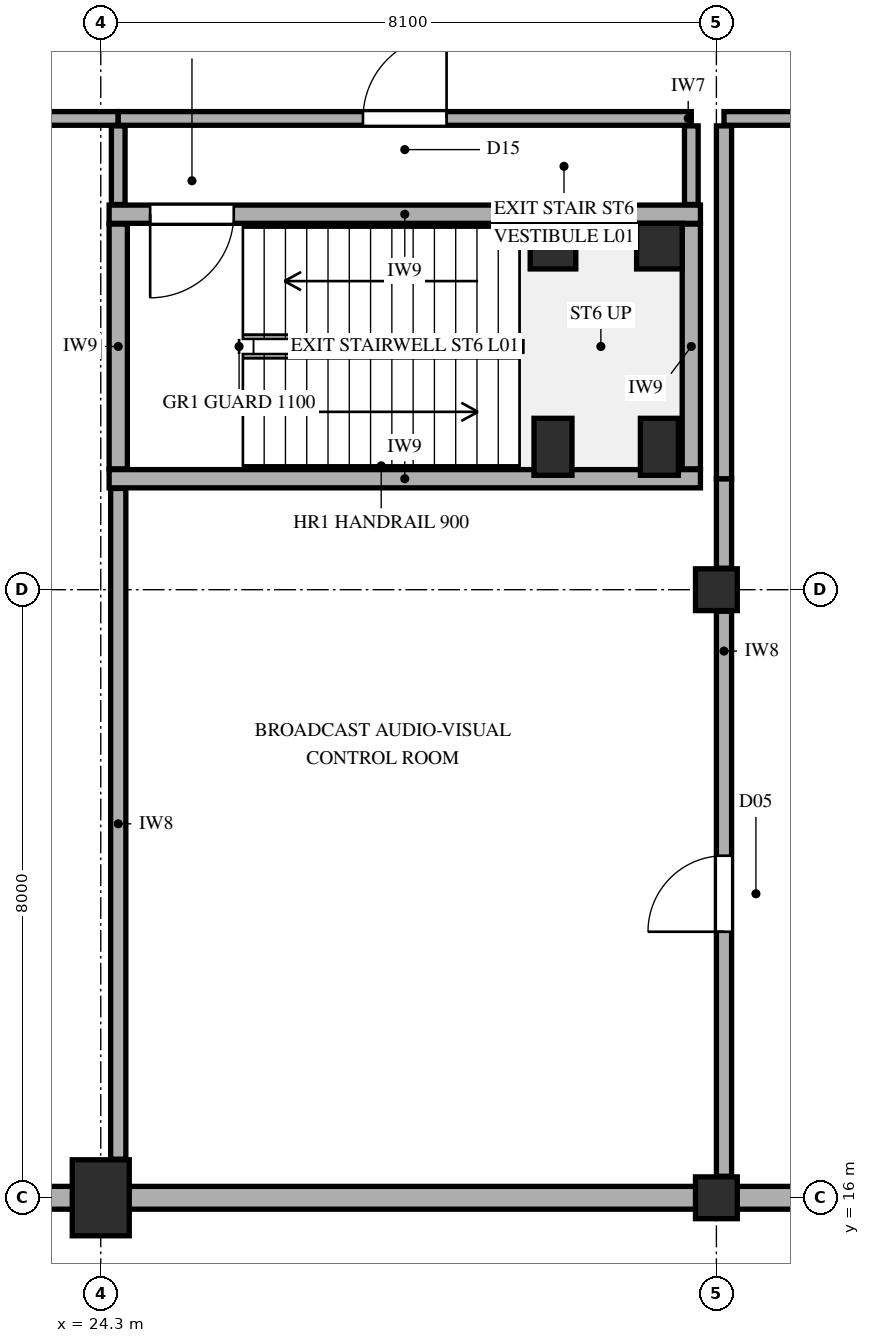
"""IFC4 building model, lengths in metres.
Left out: names, types, materials, properties, quantities, classifications, styles, units other than length and angle.
Written with IfcOpenShell. Run it as: python <this file> out.ifc"""

import sys

from ifc_helpers import new_model, si_unit, direction, frame, frame_2d, origin, origin_2d, place, context, subcontext, project, spatial, rectangle, extrude, element, fill, save


model = new_model("IFC4")
c1 = context("Model", 3, precision=1e-05, world=origin(), true_north=direction((0.0, 1.0)))
c2 = subcontext(c1, "Body", "Model", "MODEL_VIEW")
j1 = project(units=[si_unit("LENGTHUNIT", "METRE"), si_unit("PLANEANGLEUNIT", "RADIAN")], contexts=[c1])
p1 = place(None, origin())
s1 = spatial("IfcSite", under=j1, at=p1, CompositionType="ELEMENT")
p2 = place(p1, origin())
s2 = spatial("IfcBuilding", under=s1, at=p2, CompositionType="ELEMENT")
p3 = place(p2, frame((0.0, 0.0, 5.4)))
s3 = spatial("IfcBuildingStorey", under=s2, at=p3, CompositionType="ELEMENT", Elevation=5.4)
p4 = place(p3, frame((24.3, 16.0, 0.0), z_axis=(0.0, 0.0, 1.0), x_axis=(1.0, 0.0, 0.0)))
e1 = element("IfcColumn", 1, at=p4, inside=s3, PredefinedType="COLUMN", context=c2, shape_type="SweptSolid", body=[
    extrude(rectangle(XDim=0.75, YDim=1.0, at=origin_2d()), origin(), (0.0, 0.0, 1.0), 4.8),
])
p5 = place(p3, frame((30.25, 25.88, 0.0), z_axis=(0.0, 0.0, 1.0), x_axis=(1.0, 0.0, 0.0)))
e2 = element("IfcColumn", 2, at=p5, inside=s3, PredefinedType="COLUMN", context=c2, shape_type="SweptSolid", body=[
    extrude(rectangle(XDim=0.5, YDim=0.75, at=origin_2d()), origin(), (0.0, 0.0, 1.0), 4.8),
])
p6 = place(p3, frame((30.25, 28.52, 0.0), z_axis=(0.0, 0.0, 1.0), x_axis=(1.0, 0.0, 0.0)))
e3 = element("IfcColumn", 3, at=p6, inside=s3, PredefinedType="COLUMN", context=c2, shape_type="SweptSolid", body=[
    extrude(rectangle(XDim=0.6, YDim=0.6, at=origin_2d()), origin(), (0.0, 0.0, 1.0), 4.8),
])
p7 = place(p3, frame((31.65, 25.88, 0.0), z_axis=(0.0, 0.0, 1.0), x_axis=(1.0, 0.0, 0.0)))
e4 = element("IfcColumn", 4, at=p7, inside=s3, PredefinedType="COLUMN", context=c2, shape_type="SweptSolid", body=[
    extrude(rectangle(XDim=0.5, YDim=0.75, at=origin_2d()), origin(), (0.0, 0.0, 1.0), 4.8),
])
p8 = place(p3, frame((31.65, 28.52, 0.0), z_axis=(0.0, 0.0, 1.0), x_axis=(1.0, 0.0, 0.0)))
e5 = element("IfcColumn", 5, at=p8, inside=s3, PredefinedType="COLUMN", context=c2, shape_type="SweptSolid", body=[
    extrude(rectangle(XDim=0.6, YDim=0.6, at=origin_2d()), origin(), (0.0, 0.0, 1.0), 4.8),
])
for number, where, z_axis, x_axis in (
    (6, (32.4, 16.0, 0.0), (0.0, 0.0, 1.0), (1.0, 0.0, 0.0)),
    (7, (32.4, 24.0, 0.0), (0.0, 0.0, 1.0), (1.0, 0.0, 0.0)),
):
    element("IfcColumn", number, at=place(p3, frame(where, z_axis=z_axis, x_axis=x_axis)), inside=s3, PredefinedType="COLUMN", context=c2, shape_type="SweptSolid", body=[
        extrude(rectangle(XDim=0.55, YDim=0.55, at=origin_2d()), origin(), (0.0, 0.0, 1.0), 4.8),
    ])
p9 = place(p3, frame((16.2, 16.0, 0.0), z_axis=(0.0, 0.0, 1.0), x_axis=(1.0, 0.0, 0.0)))
e8 = element("IfcWall", 8, at=p9, inside=s3, PredefinedType="SOLIDWALL", context=c2, shape_type="SweptSolid", body=[
    extrude(rectangle(XDim=16.2, YDim=0.3, at=frame_2d((8.1, 0.0))), origin(), (0.0, 0.0, 1.0), 3.812),
])
p10 = place(p3, frame((32.4, 16.0, 0.0), z_axis=(0.0, 0.0, 1.0), x_axis=(1.0, 0.0, 0.0)))
e9 = element("IfcWall", 9, at=p10, inside=s3, PredefinedType="SOLIDWALL", context=c2, shape_type="SweptSolid", body=[
    extrude(rectangle(XDim=16.2, YDim=0.3, at=frame_2d((8.1, 0.0))), origin(), (0.0, 0.0, 1.0), 3.812),
])
p11 = place(p3, frame((24.41, 25.46, 0.0), z_axis=(0.0, 0.0, 1.0), x_axis=(1.0, 0.0, 0.0)))
e10 = element("IfcWall", 10, at=p11, inside=s3, PredefinedType="PARTITIONING", context=c2, shape_type="SweptSolid", body=[
    extrude(rectangle(XDim=7.78, YDim=0.24, at=frame_2d((3.89, 0.0))), origin(), (0.0, 0.0, 1.0), 4.52),
])
p12 = place(p3, frame((24.41, 28.94, 0.0), z_axis=(0.0, 0.0, 1.0), x_axis=(1.0, 0.0, 0.0)))
e11 = element("IfcWall", 11, at=p12, inside=s3, PredefinedType="PARTITIONING", context=c2, shape_type="SweptSolid", body=[
    extrude(rectangle(XDim=7.78, YDim=0.24, at=frame_2d((3.89, 0.0))), origin(), (0.0, 0.0, 1.0), 4.52),
])
p13 = place(p12, frame((0.54, 0.0, 0.0)))
e12 = element("IfcOpeningElement", 12, at=p13, cuts=e11, PredefinedType="OPENING", context=c2, shape_type="SweptSolid", body=[
    extrude(rectangle(XDim=1.1, YDim=2.2, at=frame_2d((0.55, 1.1))), frame((0.0, 0.13, 0.0), z_axis=(0.0, -1.0, 0.0), x_axis=(1.0, 0.0, 0.0)), (0.0, 0.0, 1.0), 0.26),
])
p14 = place(p3, frame((24.53, 25.59, 0.0), z_axis=(0.0, 0.0, 1.0), x_axis=(0.0, 1.0, 0.0)))
e13 = element("IfcWall", 13, at=p14, inside=s3, PredefinedType="PARTITIONING", context=c2, shape_type="SweptSolid", body=[
    extrude(rectangle(XDim=3.22, YDim=0.24, at=frame_2d((1.61, 0.0))), origin(), (0.0, 0.0, 1.0), 3.312),
])
p15 = place(p3, frame((32.07, 25.59, 0.0), z_axis=(0.0, 0.0, 1.0), x_axis=(0.0, 1.0, 0.0)))
e14 = element("IfcWall", 14, at=p15, inside=s3, PredefinedType="PARTITIONING", context=c2, shape_type="SweptSolid", body=[
    extrude(rectangle(XDim=3.22, YDim=0.24, at=frame_2d((1.61, 0.0))), origin(), (0.0, 0.0, 1.0), 3.912),
])
p16 = place(p3, frame((8.258, 30.2, 0.0), z_axis=(0.0, 0.0, 1.0), x_axis=(1.0, 0.0, 0.0)))
e15 = element("IfcWall", 15, at=p16, inside=s3, PredefinedType="PARTITIONING", context=c2, shape_type="SweptSolid", body=[
    extrude(rectangle(XDim=16.272, YDim=0.18, at=frame_2d((8.136, 0.0))), origin(), (0.0, 0.0, 1.0), 4.52),
])
p17 = place(p16, frame((4.782, 0.0, 0.0)))
e16 = element("IfcOpeningElement", 16, at=p17, cuts=e15, PredefinedType="OPENING", context=c2, shape_type="SweptSolid", body=[
    extrude(rectangle(XDim=1.5, YDim=2.3, at=frame_2d((0.75, 1.15))), frame((0.0, 0.1, 0.0), z_axis=(0.0, -1.0, 0.0), x_axis=(1.0, 0.0, 0.0)), (0.0, 0.0, 1.0), 0.2),
])
p18 = place(p3, frame((24.53, 30.2, 0.0), z_axis=(0.0, 0.0, 1.0), x_axis=(1.0, 0.0, 0.0)))
e17 = element("IfcWall", 17, at=p18, inside=s3, PredefinedType="PARTITIONING", context=c2, shape_type="SweptSolid", body=[
    extrude(rectangle(XDim=7.54, YDim=0.18, at=frame_2d((3.77, 0.0))), origin(), (0.0, 0.0, 1.0), 4.52),
])
p19 = place(p18, frame((3.22, 0.0, 0.0)))
e18 = element("IfcOpeningElement", 18, at=p19, cuts=e17, PredefinedType="OPENING", context=c2, shape_type="SweptSolid", body=[
    extrude(rectangle(XDim=1.1, YDim=2.2, at=frame_2d((0.55, 1.1))), frame((0.0, 0.1, 0.0), z_axis=(0.0, -1.0, 0.0), x_axis=(1.0, 0.0, 0.0)), (0.0, 0.0, 1.0), 0.2),
])
p20 = place(p3, frame((32.5, 30.2, 0.0), z_axis=(0.0, 0.0, 1.0), x_axis=(1.0, 0.0, 0.0)))
e19 = element("IfcWall", 19, at=p20, inside=s3, PredefinedType="PARTITIONING", context=c2, shape_type="SweptSolid", body=[
    extrude(rectangle(XDim=23.3, YDim=0.18, at=frame_2d((11.65, 0.0))), origin(), (0.0, 0.0, 1.0), 4.52),
])
p21 = place(p20, frame((10.85, 0.0, 0.0)))
e20 = element("IfcOpeningElement", 20, at=p21, cuts=e19, PredefinedType="OPENING", context=c2, shape_type="SweptSolid", body=[
    extrude(rectangle(XDim=1.6, YDim=2.35, at=frame_2d((0.8, 1.175))), frame((0.0, 0.1, 0.0), z_axis=(0.0, -1.0, 0.0), x_axis=(1.0, 0.0, 0.0)), (0.0, 0.0, 1.0), 0.2),
])
p22 = place(p3, frame((24.53, 16.508, 0.0), z_axis=(0.0, 0.0, 1.0), x_axis=(0.0, 1.0, 0.0)))
e21 = element("IfcWall", 21, at=p22, inside=s3, PredefinedType="PARTITIONING", context=c2, shape_type="SweptSolid", body=[
    extrude(rectangle(XDim=8.824, YDim=0.2, at=frame_2d((4.412, 0.0))), origin(), (0.0, 0.0, 1.0), 3.312),
])
p23 = place(p3, frame((24.53, 29.068, 0.0), z_axis=(0.0, 0.0, 1.0), x_axis=(0.0, 1.0, 0.0)))
e22 = element("IfcWall", 22, at=p23, inside=s3, PredefinedType="PARTITIONING", context=c2, shape_type="SweptSolid", body=[
    extrude(rectangle(XDim=1.034, YDim=0.18, at=frame_2d((0.517, 0.0))), origin(), (0.0, 0.0, 1.0), 3.312),
])
p24 = place(p3, frame((32.07, 29.068, 0.0), z_axis=(0.0, 0.0, 1.0), x_axis=(0.0, 1.0, 0.0)))
e23 = element("IfcWall", 23, at=p24, inside=s3, PredefinedType="PARTITIONING", context=c2, shape_type="SweptSolid", body=[
    extrude(rectangle(XDim=1.034, YDim=0.18, at=frame_2d((0.517, 0.0))), origin(), (0.0, 0.0, 1.0), 3.912),
])
p25 = place(p3, frame((32.5, 16.283, 0.0), z_axis=(0.0, 0.0, 1.0), x_axis=(0.0, 1.0, 0.0)))
e24 = element("IfcWall", 24, at=p25, inside=s3, PredefinedType="PARTITIONING", context=c2, shape_type="SweptSolid", body=[
    extrude(rectangle(XDim=7.434, YDim=0.2, at=frame_2d((3.717, 0.0))), origin(), (0.0, 0.0, 1.0), 4.095),
])
p26 = place(p25, frame((3.217, 0.0, 0.0)))
e25 = element("IfcOpeningElement", 25, at=p26, cuts=e24, PredefinedType="OPENING", context=c2, shape_type="SweptSolid", body=[
    extrude(rectangle(XDim=1.0, YDim=2.2, at=frame_2d((0.5, 1.1))), frame((0.0, 0.11, 0.0), z_axis=(0.0, -1.0, 0.0), x_axis=(1.0, 0.0, 0.0)), (0.0, 0.0, 1.0), 0.22),
])
p27 = place(p3, frame((32.5, 24.283, 0.0), z_axis=(0.0, 0.0, 1.0), x_axis=(0.0, 1.0, 0.0)))
e26 = element("IfcWall", 26, at=p27, inside=s3, PredefinedType="PARTITIONING", context=c2, shape_type="SweptSolid", body=[
    extrude(rectangle(XDim=1.177, YDim=0.2, at=frame_2d((0.588, 0.0))), origin(), (0.0, 0.0, 1.0), 3.912),
])
p28 = place(p3, frame((32.5, 25.46, 0.0), z_axis=(0.0, 0.0, 1.0), x_axis=(0.0, 1.0, 0.0)))
e27 = element("IfcWall", 27, at=p28, inside=s3, PredefinedType="PARTITIONING", context=c2, shape_type="SweptSolid", body=[
    extrude(rectangle(XDim=4.642, YDim=0.2, at=frame_2d((2.321, 0.0))), origin(), (0.0, 0.0, 1.0), 3.912),
])
p29 = place(p13, frame((1.1, 0.0, 0.0), z_axis=(0.0, 0.0, 1.0), x_axis=(-1.0, 0.0, 0.0)))
e28 = element("IfcDoor", 28, at=p29, inside=s3, OperationType="SINGLE_SWING_LEFT", PredefinedType="DOOR", context=c2, shape_type="SweptSolid", body=[
    extrude(rectangle(XDim=1.1, YDim=2.2, at=frame_2d((0.55, 1.1))), frame((0.0, 0.025, 0.0), z_axis=(0.0, -1.0, 0.0), x_axis=(1.0, 0.0, 0.0)), (0.0, 0.0, 1.0), 0.05),
])
fill(e12, e28)
p30 = place(p19, origin())
e29 = element("IfcDoor", 29, at=p30, inside=s3, OperationType="SINGLE_SWING_RIGHT", PredefinedType="DOOR", context=c2, shape_type="SweptSolid", body=[
    extrude(rectangle(XDim=1.1, YDim=2.2, at=frame_2d((0.55, 1.1))), frame((0.0, 0.025, 0.0), z_axis=(0.0, -1.0, 0.0), x_axis=(1.0, 0.0, 0.0)), (0.0, 0.0, 1.0), 0.05),
])
fill(e18, e29)
p31 = place(p26, origin())
e30 = element("IfcDoor", 30, at=p31, inside=s3, OperationType="SINGLE_SWING_LEFT", PredefinedType="DOOR", context=c2, shape_type="SweptSolid", body=[
    extrude(rectangle(XDim=1.0, YDim=2.2, at=frame_2d((0.5, 1.1))), frame((0.0, 0.025, 0.0), z_axis=(0.0, -1.0, 0.0), x_axis=(1.0, 0.0, 0.0)), (0.0, 0.0, 1.0), 0.05),
])
fill(e25, e30)
save(model, sys.argv[1])
